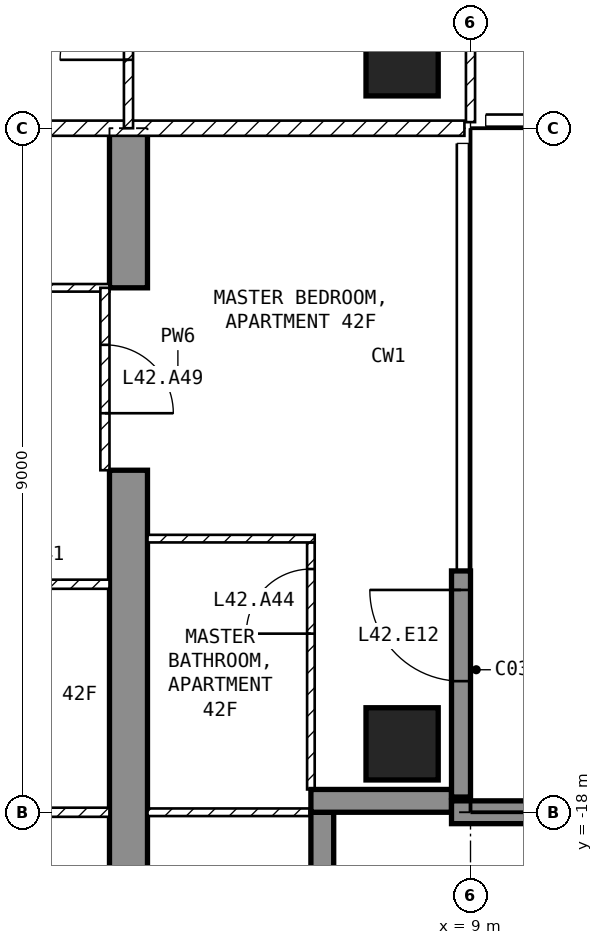
"""IFC4 building model, lengths in metres.
Left out: names, types, materials, properties, quantities, classifications, styles, units other than length and angle.
Written with IfcOpenShell. Run it as: python <this file> out.ifc"""

import sys

from ifc_helpers import new_model, si_unit, direction, frame, frame_2d, origin, origin_2d, place, context, subcontext, project, spatial, polyline, rectangle, outline, extrude, element, fill, save


model = new_model("IFC4")
c1 = context("Model", 3, precision=1e-05, world=origin(), true_north=direction((0.0, 1.0)))
c2 = subcontext(c1, "Body", "Model", "MODEL_VIEW")
j1 = project(units=[si_unit("LENGTHUNIT", "METRE"), si_unit("PLANEANGLEUNIT", "RADIAN")], contexts=[c1])
p1 = place(None, origin())
s1 = spatial("IfcSite", under=j1, at=p1, CompositionType="ELEMENT")
p2 = place(p1, origin())
s2 = spatial("IfcBuilding", under=s1, at=p2, CompositionType="ELEMENT")
p3 = place(p2, frame((0.0, 0.0, 173.6)))
s3 = spatial("IfcBuildingStorey", under=s2, at=p3, CompositionType="ELEMENT", Elevation=173.6)
for number, where, z_axis, x_axis in (
    (1, (8.1, -17.1, -0.25), (0.0, 0.0, 1.0), (1.0, 0.0, 0.0)),
    (2, (8.1, -8.1, -0.25), (0.0, 0.0, 1.0), (1.0, 0.0, 0.0)),
):
    element("IfcColumn", number, at=place(p3, frame(where, z_axis=z_axis, x_axis=x_axis)), inside=s3, PredefinedType="COLUMN", context=c2, shape_type="SweptSolid", body=[
        extrude(rectangle(XDim=0.95, YDim=0.95, at=origin_2d()), origin(), (0.0, 0.0, 1.0), 3.5),
    ])
p4 = place(p3, frame((4.25, -20.225, -0.25), z_axis=(1.0, 0.0, 0.0), x_axis=(0.0, 1.0, 0.0)))
e3 = element("IfcWall", 3, at=p4, inside=s3, PredefinedType="SHEAR", context=c2, shape_type="SweptSolid", body=[
    extrude(outline(polyline([(0.0, 0.0), (6.725, 0.0), (6.725, 2.65), (9.125, 2.65), (9.125, 0.0), (11.225, 0.0), (11.225, 3.5), (0.0, 3.5), (0.0, 0.0)])), origin(), (0.0, 0.0, 1.0), 0.5),
])
p5 = place(p3, frame((8.875, -17.8, 0.0), z_axis=(0.0, 0.0, 1.0), x_axis=(0.0, 1.0, 0.0)))
e4 = element("IfcWall", 4, at=p5, inside=s3, PredefinedType="SOLIDWALL", context=c2, shape_type="SweptSolid", body=[
    extrude(rectangle(XDim=2.975, YDim=0.25, at=frame_2d((1.488, 0.0))), origin(), (0.0, 0.0, 1.0), 3.25),
])
p6 = place(p5, frame((1.525, 0.0, 0.0)))
e5 = element("IfcOpeningElement", 5, at=p6, cuts=e4, PredefinedType="OPENING", context=c2, shape_type="SweptSolid", body=[
    extrude(rectangle(XDim=1.2, YDim=2.4, at=frame_2d((0.6, 1.2))), frame((0.0, 0.135, 0.0), z_axis=(0.0, -1.0, 0.0), x_axis=(1.0, 0.0, 0.0)), (0.0, 0.0, 1.0), 0.27),
])
p7 = place(p3, frame((7.05, -19.8, 0.0), z_axis=(0.0, 0.0, 1.0), x_axis=(0.0, 1.0, 0.0)))
e6 = element("IfcWall", 6, at=p7, inside=s3, PredefinedType="SOLIDWALL", context=c2, shape_type="SweptSolid", body=[
    extrude(rectangle(XDim=1.8, YDim=0.3, at=frame_2d((0.9, 0.0))), origin(), (0.0, 0.0, 1.0), 3.25),
])
p8 = place(p3, frame((6.9, -17.85, 0.0), z_axis=(0.0, 0.0, 1.0), x_axis=(1.0, 0.0, 0.0)))
e7 = element("IfcWall", 7, at=p8, inside=s3, PredefinedType="SOLIDWALL", context=c2, shape_type="SweptSolid", body=[
    extrude(rectangle(XDim=1.85, YDim=0.3, at=frame_2d((0.925, 0.0))), origin(), (0.0, 0.0, 1.0), 3.25),
])
p9 = place(p3, frame((8.75, -18.0, 0.0), z_axis=(0.0, 0.0, 1.0), x_axis=(1.0, 0.0, 0.0)))
e8 = element("IfcWall", 8, at=p9, inside=s3, PredefinedType="SOLIDWALL", context=c2, shape_type="SweptSolid", body=[
    extrude(rectangle(XDim=2.95, YDim=0.3, at=frame_2d((1.475, 0.0))), origin(), (0.0, 0.0, 1.0), 3.25),
])
p10 = place(p3, frame((8.92, -9.0, 0.0), z_axis=(0.0, 0.0, 1.0), x_axis=(-1.0, 0.0, 0.0)))
e9 = element("IfcWall", 9, at=p10, inside=s3, PredefinedType="PARTITIONING", context=c2, shape_type="SweptSolid", body=[
    extrude(rectangle(XDim=17.84, YDim=0.2, at=frame_2d((8.92, 0.0))), origin(), (0.0, 0.0, 1.0), 3.25),
])
p11 = place(p10, frame((8.42, 0.0, 0.0)))
e10 = element("IfcOpeningElement", 10, at=p11, cuts=e9, PredefinedType="OPENING", context=c2, shape_type="SweptSolid", body=[
    extrude(rectangle(XDim=1.0, YDim=2.1, at=frame_2d((0.5, 1.05))), frame((0.0, 0.11, 0.0), z_axis=(0.0, -1.0, 0.0), x_axis=(1.0, 0.0, 0.0)), (0.0, 0.0, 1.0), 0.22),
])
p12 = place(p3, frame((9.0, -8.92, 0.0), z_axis=(0.0, 0.0, 1.0), x_axis=(0.0, 1.0, 0.0)))
e11 = element("IfcWall", 11, at=p12, inside=s3, PredefinedType="PARTITIONING", context=c2, shape_type="SweptSolid", body=[
    extrude(rectangle(XDim=7.62, YDim=0.12, at=frame_2d((3.81, 0.0))), origin(), (0.0, 0.0, 1.0), 3.25),
])
p13 = place(p12, frame((2.42, 0.0, 0.0)))
e12 = element("IfcOpeningElement", 12, at=p13, cuts=e11, PredefinedType="OPENING", context=c2, shape_type="SweptSolid", body=[
    extrude(rectangle(XDim=0.9, YDim=2.1, at=frame_2d((0.45, 1.05))), frame((0.0, 0.07, 0.0), z_axis=(0.0, -1.0, 0.0), x_axis=(1.0, 0.0, 0.0)), (0.0, 0.0, 1.0), 0.14),
])
p14 = place(p3, frame((4.5, -9.0, 0.0), z_axis=(0.0, 0.0, 1.0), x_axis=(0.0, 1.0, 0.0)))
e13 = element("IfcWall", 13, at=p14, inside=s3, PredefinedType="PARTITIONING", context=c2, shape_type="SweptSolid", body=[
    extrude(rectangle(XDim=2.7, YDim=0.12, at=frame_2d((1.35, 0.0))), origin(), (0.0, 0.0, 1.0), 3.25),
])
p15 = place(p14, frame((0.9, 0.0, 0.0)))
e14 = element("IfcOpeningElement", 14, at=p15, cuts=e13, PredefinedType="OPENING", context=c2, shape_type="SweptSolid", body=[
    extrude(rectangle(XDim=0.9, YDim=2.1, at=frame_2d((0.45, 1.05))), frame((0.0, 0.07, 0.0), z_axis=(0.0, -1.0, 0.0), x_axis=(1.0, 0.0, 0.0)), (0.0, 0.0, 1.0), 0.14),
])
p16 = place(p3, frame((4.25, -11.1, 0.0), z_axis=(0.0, 0.0, 1.0), x_axis=(-1.0, 0.0, 0.0)))
e15 = element("IfcWall", 15, at=p16, inside=s3, PredefinedType="PARTITIONING", context=c2, shape_type="SweptSolid", body=[
    extrude(rectangle(XDim=2.15, YDim=0.1, at=frame_2d((1.075, 0.0))), origin(), (0.0, 0.0, 1.0), 3.25),
])
p17 = place(p3, frame((4.25, -15.0, 0.0), z_axis=(0.0, 0.0, 1.0), x_axis=(-1.0, 0.0, 0.0)))
e16 = element("IfcWall", 16, at=p17, inside=s3, PredefinedType="PARTITIONING", context=c2, shape_type="SweptSolid", body=[
    extrude(rectangle(XDim=3.81, YDim=0.12, at=frame_2d((1.905, 0.0))), origin(), (0.0, 0.0, 1.0), 3.25),
])
p18 = place(p17, frame((1.425, 0.0, 0.0)))
e17 = element("IfcOpeningElement", 17, at=p18, cuts=e16, PredefinedType="OPENING", context=c2, shape_type="SweptSolid", body=[
    extrude(rectangle(XDim=0.9, YDim=2.1, at=frame_2d((0.45, 1.05))), frame((0.0, 0.07, 0.0), z_axis=(0.0, -1.0, 0.0), x_axis=(1.0, 0.0, 0.0)), (0.0, 0.0, 1.0), 0.14),
])
p19 = place(p3, frame((4.25, -18.0, 0.0), z_axis=(0.0, 0.0, 1.0), x_axis=(-1.0, 0.0, 0.0)))
e18 = element("IfcWall", 18, at=p19, inside=s3, PredefinedType="PARTITIONING", context=c2, shape_type="SweptSolid", body=[
    extrude(rectangle(XDim=8.5, YDim=0.12, at=frame_2d((4.25, 0.0))), origin(), (0.0, 0.0, 1.0), 3.25),
])
p20 = place(p19, frame((5.675, 0.0, 0.0)))
e19 = element("IfcOpeningElement", 19, at=p20, cuts=e18, PredefinedType="OPENING", context=c2, shape_type="SweptSolid", body=[
    extrude(rectangle(XDim=0.9, YDim=2.1, at=frame_2d((0.45, 1.05))), frame((0.0, 0.07, 0.0), z_axis=(0.0, -1.0, 0.0), x_axis=(1.0, 0.0, 0.0)), (0.0, 0.0, 1.0), 0.14),
])
p21 = place(p3, frame((6.9, -17.7, 0.0), z_axis=(0.0, 0.0, 1.0), x_axis=(0.0, 1.0, 0.0)))
e20 = element("IfcWall", 20, at=p21, inside=s3, PredefinedType="PARTITIONING", context=c2, shape_type="SweptSolid", body=[
    extrude(rectangle(XDim=3.25, YDim=0.1, at=frame_2d((1.625, 0.0))), origin(), (0.0, 0.0, 1.0), 3.25),
])
p22 = place(p21, frame((2.05, 0.0, 0.0)))
e21 = element("IfcOpeningElement", 21, at=p22, cuts=e20, PredefinedType="OPENING", context=c2, shape_type="SweptSolid", body=[
    extrude(rectangle(XDim=0.85, YDim=2.1, at=frame_2d((0.425, 1.05))), frame((0.0, 0.06, 0.0), z_axis=(0.0, -1.0, 0.0), x_axis=(1.0, 0.0, 0.0)), (0.0, 0.0, 1.0), 0.12),
])
p23 = place(p3, frame((6.95, -14.4, 0.0), z_axis=(0.0, 0.0, 1.0), x_axis=(-1.0, 0.0, 0.0)))
e22 = element("IfcWall", 22, at=p23, inside=s3, PredefinedType="PARTITIONING", context=c2, shape_type="SweptSolid", body=[
    extrude(rectangle(XDim=2.2, YDim=0.1, at=frame_2d((1.1, 0.0))), origin(), (0.0, 0.0, 1.0), 3.25),
])
p24 = place(p3, frame((7.12, -18.0, 0.0), z_axis=(0.0, 0.0, 1.0), x_axis=(-1.0, 0.0, 0.0)))
e23 = element("IfcWall", 23, at=p24, inside=s3, PredefinedType="PARTITIONING", context=c2, shape_type="SweptSolid", body=[
    extrude(rectangle(XDim=2.37, YDim=0.1, at=frame_2d((1.185, 0.0))), origin(), (0.0, 0.0, 1.0), 3.25),
])
p25 = place(p3, frame((4.19, -11.1, 0.0), z_axis=(0.0, 0.0, 1.0), x_axis=(0.0, -1.0, 0.0)))
e24 = element("IfcWall", 24, at=p25, inside=s3, PredefinedType="PARTITIONING", context=c2, shape_type="SweptSolid", body=[
    extrude(rectangle(XDim=2.4, YDim=0.12, at=frame_2d((1.2, 0.0))), origin(), (0.0, 0.0, 1.0), 2.4),
])
p26 = place(p25, frame((0.75, 0.0, 0.0)))
e25 = element("IfcOpeningElement", 25, at=p26, cuts=e24, PredefinedType="OPENING", context=c2, shape_type="SweptSolid", body=[
    extrude(rectangle(XDim=0.9, YDim=2.1, at=frame_2d((0.45, 1.05))), frame((0.0, 0.07, 0.0), z_axis=(0.0, -1.0, 0.0), x_axis=(1.0, 0.0, 0.0)), (0.0, 0.0, 1.0), 0.14),
])
p27 = place(p6, origin())
e26 = element("IfcDoor", 26, at=p27, inside=s3, OperationType="SINGLE_SWING_RIGHT", PredefinedType="DOOR", context=c2, shape_type="SweptSolid", body=[
    extrude(rectangle(XDim=1.2, YDim=2.4, at=frame_2d((0.6, 1.2))), frame((0.0, 0.025, 0.0), z_axis=(0.0, -1.0, 0.0), x_axis=(1.0, 0.0, 0.0)), (0.0, 0.0, 1.0), 0.05),
])
fill(e5, e26)
p28 = place(p15, origin())
e27 = element("IfcDoor", 27, at=p28, inside=s3, OperationType="SINGLE_SWING_LEFT", PredefinedType="DOOR", context=c2, shape_type="SweptSolid", body=[
    extrude(rectangle(XDim=0.9, YDim=2.1, at=frame_2d((0.45, 1.05))), frame((0.0, 0.025, 0.0), z_axis=(0.0, -1.0, 0.0), x_axis=(1.0, 0.0, 0.0)), (0.0, 0.0, 1.0), 0.05),
])
fill(e14, e27)
p29 = place(p22, origin())
e28 = element("IfcDoor", 28, at=p29, inside=s3, OperationType="SINGLE_SWING_LEFT", PredefinedType="DOOR", context=c2, shape_type="SweptSolid", body=[
    extrude(rectangle(XDim=0.85, YDim=2.1, at=frame_2d((0.425, 1.05))), frame((0.0, 0.025, 0.0), z_axis=(0.0, -1.0, 0.0), x_axis=(1.0, 0.0, 0.0)), (0.0, 0.0, 1.0), 0.05),
])
fill(e21, e28)
p30 = place(p26, origin())
e29 = element("IfcDoor", 29, at=p30, inside=s3, OperationType="SINGLE_SWING_RIGHT", PredefinedType="DOOR", context=c2, shape_type="SweptSolid", body=[
    extrude(rectangle(XDim=0.9, YDim=2.1, at=frame_2d((0.45, 1.05))), frame((0.0, 0.025, 0.0), z_axis=(0.0, -1.0, 0.0), x_axis=(1.0, 0.0, 0.0)), (0.0, 0.0, 1.0), 0.05),
])
fill(e25, e29)
save(model, sys.argv[1])
